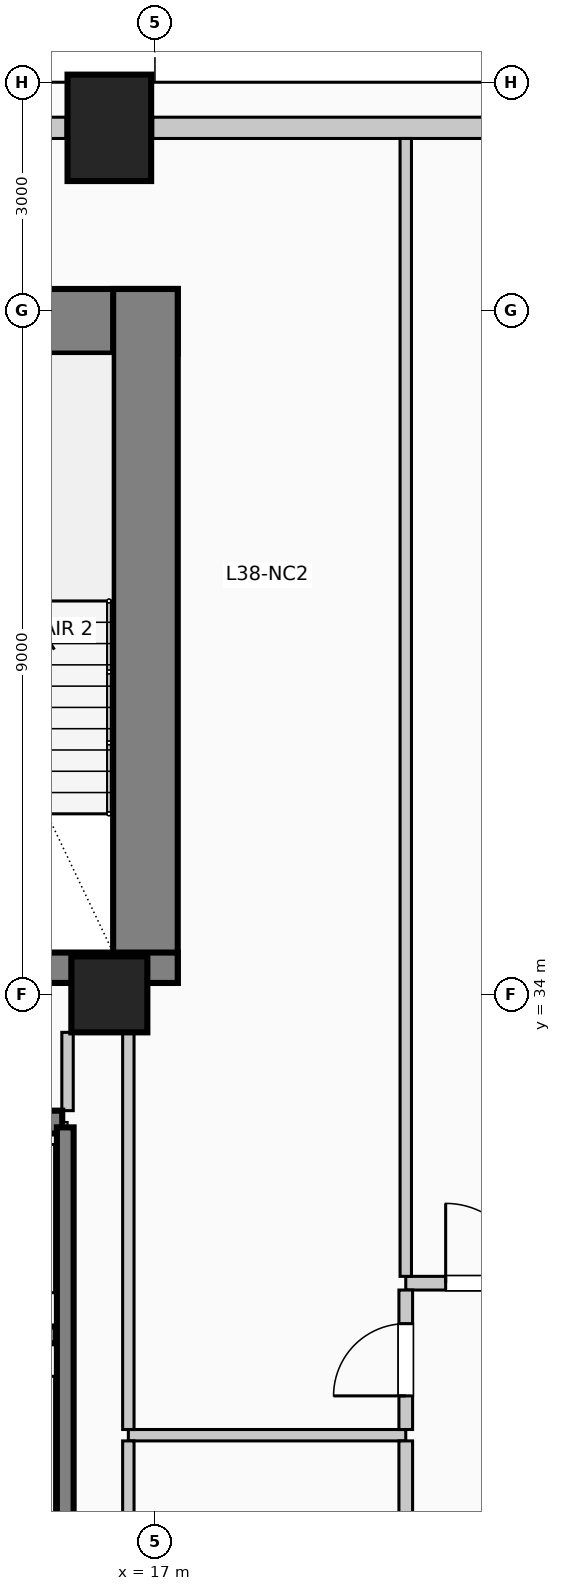
"""IFC4 building model, lengths in metres.
Left out: names, types, materials, properties, quantities, classifications, styles, units other than length and angle.
Written with IfcOpenShell. Run it as: python <this file> out.ifc"""

import sys

from ifc_helpers import new_model, si_unit, direction, frame, frame_2d, origin, origin_2d, place, context, subcontext, project, spatial, rectangle, circle, extrude, element, fill, save


model = new_model("IFC4")
c1 = context("Model", 3, precision=1e-05, world=origin(), true_north=direction((0.0, 1.0)))
c2 = subcontext(c1, "Body", "Model", "MODEL_VIEW")
j1 = project(units=[si_unit("LENGTHUNIT", "METRE"), si_unit("PLANEANGLEUNIT", "RADIAN")], contexts=[c1])
p1 = place(None, origin())
s1 = spatial("IfcSite", under=j1, at=p1, CompositionType="ELEMENT")
p2 = place(p1, origin())
s2 = spatial("IfcBuilding", under=s1, at=p2, CompositionType="ELEMENT")
p3 = place(p2, frame((0.0, 0.0, 156.6)))
s3 = spatial("IfcBuildingStorey", under=s2, at=p3, CompositionType="ELEMENT", Elevation=156.6)
p4 = place(p3, frame((2.7, 42.855, 0.0), z_axis=(0.0, 0.0, 1.0), x_axis=(1.0, 0.0, 0.0)))
e1 = element("IfcWall", 1, at=p4, inside=s3, PredefinedType="SHEAR", context=c2, shape_type="SweptSolid", body=[
    extrude(rectangle(XDim=14.6, YDim=0.85, at=frame_2d((7.3, 0.0))), origin(), (0.0, 0.0, 1.0), 4.0),
])
p5 = place(p3, frame((16.875, 34.15, 0.0), z_axis=(0.0, 0.0, 1.0), x_axis=(0.0, 1.0, 0.0)))
e2 = element("IfcWall", 2, at=p5, inside=s3, PredefinedType="SHEAR", context=c2, shape_type="SweptSolid", body=[
    extrude(rectangle(XDim=9.13, YDim=0.85, at=frame_2d((4.565, 0.0))), origin(), (0.0, 0.0, 1.0), 4.0),
])
p6 = place(p3, frame((12.29, 34.35, 0.0), z_axis=(0.0, 0.0, 1.0), x_axis=(1.0, 0.0, 0.0)))
e3 = element("IfcWall", 3, at=p6, inside=s3, PredefinedType="SHEAR", context=c2, shape_type="SweptSolid", body=[
    extrude(rectangle(XDim=5.01, YDim=0.4, at=frame_2d((2.505, 0.0))), origin(), (0.0, 0.0, 1.0), 4.0),
])
p7 = place(p6, frame((1.4, 0.0, 0.0)))
e4 = element("IfcOpeningElement", 4, at=p7, cuts=e3, PredefinedType="OPENING", context=c2, shape_type="SweptSolid", body=[
    extrude(rectangle(XDim=1.15, YDim=2.2, at=frame_2d((0.575, 1.1))), frame((0.0, 0.21, 0.0), z_axis=(0.0, -1.0, 0.0), x_axis=(1.0, 0.0, 0.0)), (0.0, 0.0, 1.0), 0.42),
])
p8 = place(p3, frame((16.4, 45.4, 0.0), z_axis=(0.0, 0.0, 1.0), x_axis=(1.0, 0.0, 0.0)))
e5 = element("IfcColumn", 5, at=p8, inside=s3, PredefinedType="COLUMN", context=c2, shape_type="SweptSolid", body=[
    extrude(rectangle(XDim=1.1, YDim=1.4, at=origin_2d()), origin(), (0.0, 0.0, 1.0), 4.0),
])
p9 = place(p3, frame((16.4, 34.0, 0.0), z_axis=(0.0, 0.0, 1.0), x_axis=(1.0, 0.0, 0.0)))
e6 = element("IfcColumn", 6, at=p9, inside=s3, PredefinedType="COLUMN", context=c2, shape_type="SweptSolid", body=[
    extrude(circle(Radius=0.5, at=origin_2d()), origin(), (0.0, 0.0, 1.0), 4.0),
])
p10 = place(p3, frame((14.445, 45.4, 0.0), z_axis=(0.0, 0.0, 1.0), x_axis=(1.0, 0.0, 0.0)))
e7 = element("IfcWall", 7, at=p10, inside=s3, PredefinedType="SOLIDWALL", context=c2, shape_type="SweptSolid", body=[
    extrude(rectangle(XDim=1.385, YDim=0.28, at=frame_2d((0.692, 0.0))), origin(), (0.0, 0.0, 1.0), 2.81),
])
p11 = place(p3, frame((16.97, 45.4, 0.0), z_axis=(0.0, 0.0, 1.0), x_axis=(1.0, 0.0, 0.0)))
e8 = element("IfcWall", 8, at=p11, inside=s3, PredefinedType="SOLIDWALL", context=c2, shape_type="SweptSolid", body=[
    extrude(rectangle(XDim=6.46, YDim=0.28, at=frame_2d((3.23, 0.0))), origin(), (0.0, 0.0, 1.0), 2.81),
])
p12 = place(p3, frame((14.0, 32.32, 0.0), z_axis=(0.0, 0.0, 1.0), x_axis=(1.0, 0.0, 0.0)))
e9 = element("IfcWall", 9, at=p12, inside=s3, PredefinedType="SOLIDWALL", context=c2, shape_type="SweptSolid", body=[
    extrude(rectangle(XDim=1.78, YDim=0.3, at=frame_2d((0.89, 0.0))), origin(), (0.0, 0.0, 1.0), 4.0),
])
p13 = place(p12, frame((0.34, 0.0, 0.0)))
e10 = element("IfcOpeningElement", 10, at=p13, cuts=e9, PredefinedType="OPENING", context=c2, shape_type="SweptSolid", body=[
    extrude(rectangle(XDim=1.1, YDim=2.2, at=frame_2d((0.55, 1.1))), frame((0.0, 0.16, 0.0), z_axis=(0.0, -1.0, 0.0), x_axis=(1.0, 0.0, 0.0)), (0.0, 0.0, 1.0), 0.32),
])
p14 = place(p3, frame((15.82, 26.8, 0.0), z_axis=(0.0, 0.0, 1.0), x_axis=(0.0, 1.0, 0.0)))
e11 = element("IfcWall", 11, at=p14, inside=s3, PredefinedType="SOLIDWALL", context=c2, shape_type="SweptSolid", body=[
    extrude(rectangle(XDim=5.45, YDim=0.22, at=frame_2d((2.725, 0.0))), origin(), (0.0, 0.0, 1.0), 4.0),
])
p15 = place(p3, frame((12.3, 29.52, 0.0), z_axis=(0.0, 0.0, 1.0), x_axis=(1.0, 0.0, 0.0)))
e12 = element("IfcWall", 12, at=p15, inside=s3, PredefinedType="SOLIDWALL", context=c2, shape_type="SweptSolid", body=[
    extrude(rectangle(XDim=3.4, YDim=0.22, at=frame_2d((1.7, 0.0))), origin(), (0.0, 0.0, 1.0), 4.0),
])
p16 = place(p3, frame((16.65, 28.2, 0.0), z_axis=(0.0, 0.0, 1.0), x_axis=(1.0, 0.0, 0.0)))
e13 = element("IfcWall", 13, at=p16, inside=s3, PredefinedType="PARTITIONING", context=c2, shape_type="SweptSolid", body=[
    extrude(rectangle(XDim=3.65, YDim=0.15, at=frame_2d((1.825, 0.0))), origin(), (0.0, 0.0, 1.0), 3.66),
])
p17 = place(p3, frame((20.3, 30.2, 0.0), z_axis=(0.0, 0.0, 1.0), x_axis=(1.0, 0.0, 0.0)))
e14 = element("IfcWall", 14, at=p17, inside=s3, PredefinedType="PARTITIONING", context=c2, shape_type="SweptSolid", body=[
    extrude(rectangle(XDim=2.1, YDim=0.18, at=frame_2d((1.05, 0.0))), origin(), (0.0, 0.0, 1.0), 3.66),
])
p18 = place(p17, frame((0.525, 0.0, 0.0)))
e15 = element("IfcOpeningElement", 15, at=p18, cuts=e14, PredefinedType="OPENING", context=c2, shape_type="SweptSolid", body=[
    extrude(rectangle(XDim=1.05, YDim=2.15, at=frame_2d((0.525, 1.075))), frame((0.0, 0.1, 0.0), z_axis=(0.0, -1.0, 0.0), x_axis=(1.0, 0.0, 0.0)), (0.0, 0.0, 1.0), 0.2),
])
p19 = place(p3, frame((15.85, 32.47, 0.0), z_axis=(0.0, 0.0, 1.0), x_axis=(0.0, 1.0, 0.0)))
e16 = element("IfcWall", 16, at=p19, inside=s3, PredefinedType="PARTITIONING", context=c2, shape_type="SweptSolid", body=[
    extrude(rectangle(XDim=1.03, YDim=0.15, at=frame_2d((0.515, 0.0))), origin(), (0.0, 0.0, 1.0), 3.66),
])
p20 = place(p3, frame((16.65, 18.5, 0.0), z_axis=(0.0, 0.0, 1.0), x_axis=(0.0, 1.0, 0.0)))
e17 = element("IfcWall", 17, at=p20, inside=s3, PredefinedType="PARTITIONING", context=c2, shape_type="SweptSolid", body=[
    extrude(rectangle(XDim=9.625, YDim=0.15, at=frame_2d((4.812, 0.0))), origin(), (0.0, 0.0, 1.0), 3.005),
])
p21 = place(p3, frame((16.65, 28.275, 0.0), z_axis=(0.0, 0.0, 1.0), x_axis=(0.0, 1.0, 0.0)))
e18 = element("IfcWall", 18, at=p21, inside=s3, PredefinedType="PARTITIONING", context=c2, shape_type="SweptSolid", body=[
    extrude(rectangle(XDim=5.225, YDim=0.15, at=frame_2d((2.613, 0.0))), origin(), (0.0, 0.0, 1.0), 3.005),
])
p22 = place(p3, frame((20.3, 15.74, 0.0), z_axis=(0.0, 0.0, 1.0), x_axis=(0.0, 1.0, 0.0)))
e19 = element("IfcWall", 19, at=p22, inside=s3, PredefinedType="PARTITIONING", context=c2, shape_type="SweptSolid", body=[
    extrude(rectangle(XDim=12.385, YDim=0.18, at=frame_2d((6.192, 0.0))), origin(), (0.0, 0.0, 1.0), 3.66),
])
p23 = place(p3, frame((20.3, 28.275, 0.0), z_axis=(0.0, 0.0, 1.0), x_axis=(0.0, 1.0, 0.0)))
e20 = element("IfcWall", 20, at=p23, inside=s3, PredefinedType="PARTITIONING", context=c2, shape_type="SweptSolid", body=[
    extrude(rectangle(XDim=1.835, YDim=0.18, at=frame_2d((0.917, 0.0))), origin(), (0.0, 0.0, 1.0), 3.66),
])
p24 = place(p23, frame((0.442, 0.0, 0.0)))
e21 = element("IfcOpeningElement", 21, at=p24, cuts=e20, PredefinedType="OPENING", context=c2, shape_type="SweptSolid", body=[
    extrude(rectangle(XDim=0.95, YDim=2.15, at=frame_2d((0.475, 1.075))), frame((0.0, 0.1, 0.0), z_axis=(0.0, -1.0, 0.0), x_axis=(1.0, 0.0, 0.0)), (0.0, 0.0, 1.0), 0.2),
])
p25 = place(p3, frame((20.3, 30.29, 0.0), z_axis=(0.0, 0.0, 1.0), x_axis=(0.0, 1.0, 0.0)))
e22 = element("IfcWall", 22, at=p25, inside=s3, PredefinedType="PARTITIONING", context=c2, shape_type="SweptSolid", body=[
    extrude(rectangle(XDim=14.97, YDim=0.15, at=frame_2d((7.485, 0.0))), origin(), (0.0, 0.0, 1.0), 3.66),
])
p26 = place(p18, origin())
e23 = element("IfcDoor", 23, at=p26, inside=s3, OperationType="SINGLE_SWING_LEFT", PredefinedType="DOOR", context=c2, shape_type="SweptSolid", body=[
    extrude(rectangle(XDim=1.05, YDim=2.15, at=frame_2d((0.525, 1.075))), frame((0.0, 0.025, 0.0), z_axis=(0.0, -1.0, 0.0), x_axis=(1.0, 0.0, 0.0)), (0.0, 0.0, 1.0), 0.05),
])
fill(e15, e23)
p27 = place(p24, origin())
e24 = element("IfcDoor", 24, at=p27, inside=s3, OperationType="SINGLE_SWING_LEFT", PredefinedType="DOOR", context=c2, shape_type="SweptSolid", body=[
    extrude(rectangle(XDim=0.95, YDim=2.15, at=frame_2d((0.475, 1.075))), frame((0.0, 0.025, 0.0), z_axis=(0.0, -1.0, 0.0), x_axis=(1.0, 0.0, 0.0)), (0.0, 0.0, 1.0), 0.05),
])
fill(e21, e24)
save(model, sys.argv[1])
